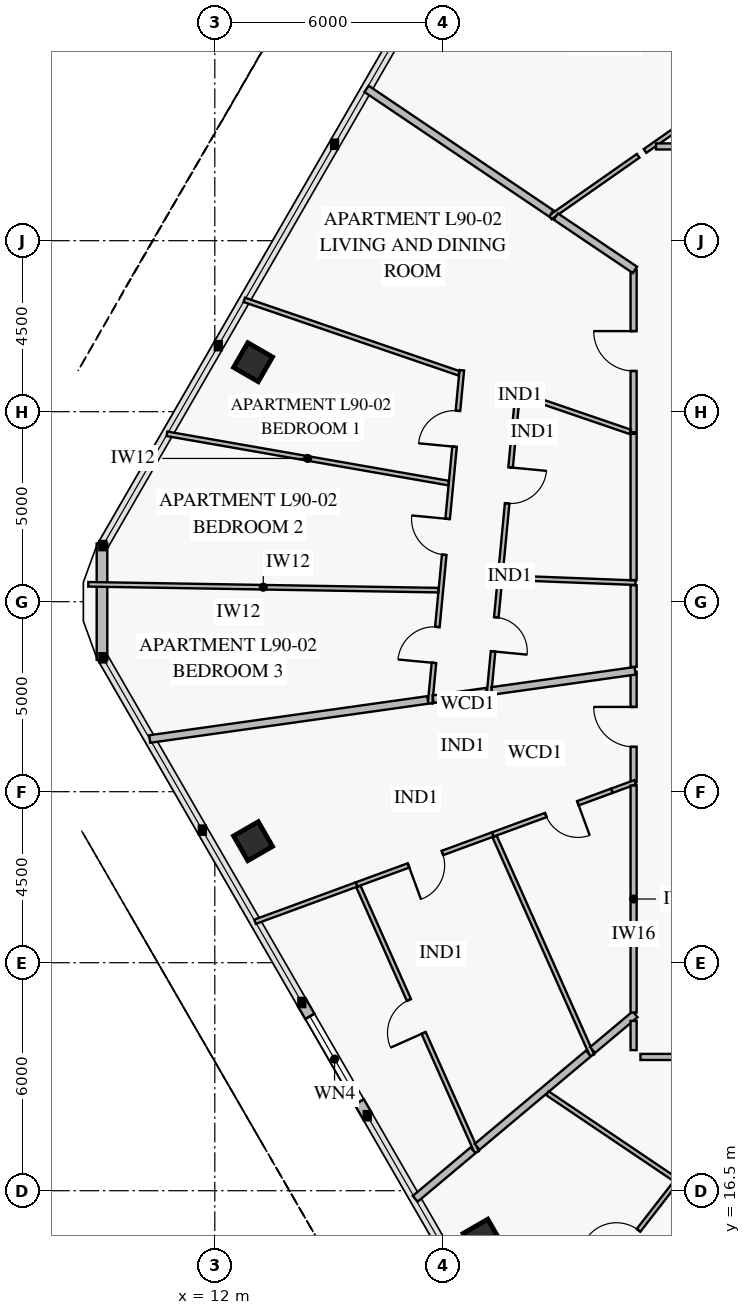
"""IFC4 building model, lengths in metres.
Left out: names, types, materials, properties, quantities, classifications, styles, units other than length and angle.
Written with IfcOpenShell. Run it as: python <this file> out.ifc"""

import sys

from ifc_helpers import new_model, si_unit, direction, frame, frame_2d, origin, origin_2d, place, context, subcontext, project, spatial, rectangle, extrude, element, fill, save


model = new_model("IFC4")
c1 = context("Model", 3, precision=1e-05, world=origin(), true_north=direction((0.0, 1.0)))
c2 = subcontext(c1, "Body", "Model", "MODEL_VIEW")
j1 = project(units=[si_unit("LENGTHUNIT", "METRE"), si_unit("PLANEANGLEUNIT", "RADIAN")], contexts=[c1])
p1 = place(None, origin())
s1 = spatial("IfcSite", under=j1, at=p1, CompositionType="ELEMENT")
p2 = place(p1, origin())
s2 = spatial("IfcBuilding", under=s1, at=p2, CompositionType="ELEMENT")
p3 = place(p2, frame((0.0, 0.0, 353.8)))
s3 = spatial("IfcBuildingStorey", under=s2, at=p3, CompositionType="ELEMENT", Elevation=353.8)
for number, where, z_axis, x_axis in (
    (1, (13.007, 38.302, 0.0), (0.0, 0.0, 1.0), (-0.5, -0.866, 0.0)),
    (2, (13.007, 25.698, 0.0), (0.0, 0.0, 1.0), (0.5, -0.866, 0.0)),
    (3, (19.045, 15.238, 0.0), (0.0, 0.0, 1.0), (0.5, -0.866, 0.0)),
):
    element("IfcColumn", number, at=place(p3, frame(where, z_axis=z_axis, x_axis=x_axis)), inside=s3, PredefinedType="COLUMN", context=c2, shape_type="SweptSolid", body=[
        extrude(rectangle(XDim=0.75, YDim=0.75, at=origin_2d()), origin(), (0.0, 0.0, 1.0), 3.35),
    ])
p4 = place(p3, frame((16.011, 18.473, 0.0), z_axis=(0.0, 0.0, 1.0), x_axis=(-0.500009156386, 0.866020117278, 0.0)))
e4 = element("IfcWall", 4, at=p4, inside=s3, PredefinedType="SOLIDWALL", context=c2, shape_type="SweptSolid", body=[
    extrude(rectangle(XDim=3.44, YDim=0.28, at=frame_2d((1.72, 0.0))), origin(), (0.0, 0.0, 1.0), 3.35),
])
p5 = place(p4, frame((0.42, 0.0, 0.7)))
e5 = element("IfcOpeningElement", 5, at=p5, cuts=e4, PredefinedType="OPENING", context=c2, shape_type="SweptSolid", body=[
    extrude(rectangle(XDim=2.6, YDim=1.8, at=frame_2d((1.3, 0.9))), frame((0.0, 0.152, 0.0), z_axis=(0.0, -1.0, 0.0), x_axis=(1.0, 0.0, 0.0)), (0.0, 0.0, 1.0), 0.304),
])
p6 = place(p3, frame((9.031, 30.468, 0.0), z_axis=(0.0, 0.0, 1.0), x_axis=(0.0, 1.0, 0.0)))
e6 = element("IfcWall", 6, at=p6, inside=s3, PredefinedType="SOLIDWALL", context=c2, shape_type="SweptSolid", body=[
    extrude(rectangle(XDim=3.065, YDim=0.28, at=frame_2d((1.532, 0.0))), origin(), (0.0, 0.0, 1.0), 3.35),
])
p7 = place(p3, frame((19.979, 37.585, 0.0), z_axis=(0.0, 0.0, 1.0), x_axis=(-0.094824773931, -0.995493979012, 0.0)))
e7 = element("IfcWall", 7, at=p7, inside=s3, PredefinedType="PARTITIONING", context=c2, shape_type="SweptSolid", body=[
    extrude(rectangle(XDim=8.082, YDim=0.12, at=frame_2d((4.041, 0.0))), origin(), (0.0, 0.0, 1.0), 2.8),
])
p8 = place(p7, frame((2.061, 0.0, 0.0)))
e8 = element("IfcOpeningElement", 8, at=p8, cuts=e7, PredefinedType="OPENING", context=c2, shape_type="SweptSolid", body=[
    extrude(rectangle(XDim=0.95, YDim=2.1, at=frame_2d((0.475, 1.05))), frame((0.0, 0.072, 0.0), z_axis=(0.0, -1.0, 0.0), x_axis=(1.0, 0.0, 0.0)), (0.0, 0.0, 1.0), 0.144),
])
p9 = place(p7, frame((6.024, 0.0, 0.0)))
e9 = element("IfcOpeningElement", 9, at=p9, cuts=e7, PredefinedType="OPENING", context=c2, shape_type="SweptSolid", body=[
    extrude(rectangle(XDim=0.9, YDim=2.1, at=frame_2d((0.45, 1.05))), frame((0.0, 0.072, 0.0), z_axis=(0.0, -1.0, 0.0), x_axis=(1.0, 0.0, 0.0)), (0.0, 0.0, 1.0), 0.144),
])
p10 = place(p3, frame((18.5, 38.091, 0.0), z_axis=(0.0, 0.0, 1.0), x_axis=(-0.094793396489, -0.995496967339, 0.0)))
e10 = element("IfcWall", 10, at=p10, inside=s3, PredefinedType="PARTITIONING", context=c2, shape_type="SweptSolid", body=[
    extrude(rectangle(XDim=8.808, YDim=0.12, at=frame_2d((4.404, 0.0))), origin(), (0.0, 0.0, 1.0), 2.8),
])
p11 = place(p10, frame((1.072, 0.0, 0.0)))
e11 = element("IfcOpeningElement", 11, at=p11, cuts=e10, PredefinedType="OPENING", context=c2, shape_type="SweptSolid", body=[
    extrude(rectangle(XDim=0.95, YDim=2.1, at=frame_2d((0.475, 1.05))), frame((0.0, 0.072, 0.0), z_axis=(0.0, -1.0, 0.0), x_axis=(1.0, 0.0, 0.0)), (0.0, 0.0, 1.0), 0.144),
])
p12 = place(p10, frame((3.929, 0.0, 0.0)))
e12 = element("IfcOpeningElement", 12, at=p12, cuts=e10, PredefinedType="OPENING", context=c2, shape_type="SweptSolid", body=[
    extrude(rectangle(XDim=0.95, YDim=2.1, at=frame_2d((0.475, 1.05))), frame((0.0, 0.072, 0.0), z_axis=(0.0, -1.0, 0.0), x_axis=(1.0, 0.0, 0.0)), (0.0, 0.0, 1.0), 0.144),
])
p13 = place(p10, frame((6.786, 0.0, 0.0)))
e13 = element("IfcOpeningElement", 13, at=p13, cuts=e10, PredefinedType="OPENING", context=c2, shape_type="SweptSolid", body=[
    extrude(rectangle(XDim=0.95, YDim=2.1, at=frame_2d((0.475, 1.05))), frame((0.0, 0.072, 0.0), z_axis=(0.0, -1.0, 0.0), x_axis=(1.0, 0.0, 0.0)), (0.0, 0.0, 1.0), 0.144),
])
p14 = place(p3, frame((23.02, 40.731, 0.0), z_axis=(0.0, 0.0, 1.0), x_axis=(0.0, -1.0, 0.0)))
e14 = element("IfcWall", 14, at=p14, inside=s3, PredefinedType="PARTITIONING", context=c2, shape_type="SweptSolid", body=[
    extrude(rectangle(XDim=4.271, YDim=0.16, at=frame_2d((2.135, 0.0))), origin(), (0.0, 0.0, 1.0), 3.35),
])
p15 = place(p14, frame((1.611, 0.0, 0.0)))
e15 = element("IfcOpeningElement", 15, at=p15, cuts=e14, PredefinedType="OPENING", context=c2, shape_type="SweptSolid", body=[
    extrude(rectangle(XDim=1.05, YDim=2.15, at=frame_2d((0.525, 1.075))), frame((0.0, 0.092, 0.0), z_axis=(0.0, -1.0, 0.0), x_axis=(1.0, 0.0, 0.0)), (0.0, 0.0, 1.0), 0.184),
])
p16 = place(p3, frame((22.45, 27.025, 0.0), z_axis=(0.0, 0.0, 1.0), x_axis=(-0.938729085526, -0.344655921155, 0.0)))
e16 = element("IfcWall", 16, at=p16, inside=s3, PredefinedType="PARTITIONING", context=c2, shape_type="SweptSolid", body=[
    extrude(rectangle(XDim=3.343, YDim=0.12, at=frame_2d((1.671, 0.0))), origin(), (0.0, 0.0, 1.0), 3.35),
])
p17 = place(p16, frame((0.954, 0.0, 0.0)))
e17 = element("IfcOpeningElement", 17, at=p17, cuts=e16, PredefinedType="OPENING", context=c2, shape_type="SweptSolid", body=[
    extrude(rectangle(XDim=0.9, YDim=2.1, at=frame_2d((0.45, 1.05))), frame((0.0, 0.072, 0.0), z_axis=(0.0, -1.0, 0.0), x_axis=(1.0, 0.0, 0.0)), (0.0, 0.0, 1.0), 0.144),
])
p18 = place(p3, frame((19.312, 25.873, 0.0), z_axis=(0.0, 0.0, 1.0), x_axis=(-0.938737752341, -0.344632314692, 0.0)))
e18 = element("IfcWall", 18, at=p18, inside=s3, PredefinedType="PARTITIONING", context=c2, shape_type="SweptSolid", body=[
    extrude(rectangle(XDim=3.818, YDim=0.12, at=frame_2d((1.909, 0.0))), origin(), (0.0, 0.0, 1.0), 3.0),
])
p19 = place(p18, frame((1.409, 0.0, 0.0)))
e19 = element("IfcOpeningElement", 19, at=p19, cuts=e18, PredefinedType="OPENING", context=c2, shape_type="SweptSolid", body=[
    extrude(rectangle(XDim=0.95, YDim=2.1, at=frame_2d((0.475, 1.05))), frame((0.0, 0.072, 0.0), z_axis=(0.0, -1.0, 0.0), x_axis=(1.0, 0.0, 0.0)), (0.0, 0.0, 1.0), 0.144),
])
p20 = place(p3, frame((15.779, 24.504, 0.0), z_axis=(0.0, 0.0, 1.0), x_axis=(0.406754151675, -0.913537662111, 0.0)))
e20 = element("IfcWall", 20, at=p20, inside=s3, PredefinedType="PARTITIONING", context=c2, shape_type="SweptSolid", body=[
    extrude(rectangle(XDim=7.652, YDim=0.12, at=frame_2d((3.826, 0.0))), origin(), (0.0, 0.0, 1.0), 3.35),
])
p21 = place(p20, frame((3.267, 0.0, 0.0)))
e21 = element("IfcOpeningElement", 21, at=p21, cuts=e20, PredefinedType="OPENING", context=c2, shape_type="SweptSolid", body=[
    extrude(rectangle(XDim=0.95, YDim=2.1, at=frame_2d((0.475, 1.05))), frame((0.0, 0.072, 0.0), z_axis=(0.0, -1.0, 0.0), x_axis=(1.0, 0.0, 0.0)), (0.0, 0.0, 1.0), 0.144),
])
p22 = place(p3, frame((23.02, 30.156, 0.0), z_axis=(0.0, 0.0, 1.0), x_axis=(0.0, -1.0, 0.0)))
e22 = element("IfcWall", 22, at=p22, inside=s3, PredefinedType="PARTITIONING", context=c2, shape_type="SweptSolid", body=[
    extrude(rectangle(XDim=2.9, YDim=0.16, at=frame_2d((1.45, 0.0))), origin(), (0.0, 0.0, 1.0), 2.8),
])
p23 = place(p22, frame((0.925, 0.0, 0.0)))
e23 = element("IfcOpeningElement", 23, at=p23, cuts=e22, PredefinedType="OPENING", context=c2, shape_type="SweptSolid", body=[
    extrude(rectangle(XDim=1.05, YDim=2.15, at=frame_2d((0.525, 1.075))), frame((0.0, 0.092, 0.0), z_axis=(0.0, -1.0, 0.0), x_axis=(1.0, 0.0, 0.0)), (0.0, 0.0, 1.0), 0.184),
])
p24 = place(p3, frame((24.149, 16.744, 0.0), z_axis=(0.0, 0.0, 1.0), x_axis=(-0.613439949778, -0.789741367801, 0.0)))
e24 = element("IfcWall", 24, at=p24, inside=s3, PredefinedType="PARTITIONING", context=c2, shape_type="SweptSolid", body=[
    extrude(rectangle(XDim=3.073, YDim=0.12, at=frame_2d((1.536, 0.0))), origin(), (0.0, 0.0, 1.0), 3.35),
])
p25 = place(p24, frame((1.628, 0.0, 0.0)))
e25 = element("IfcOpeningElement", 25, at=p25, cuts=e24, PredefinedType="OPENING", context=c2, shape_type="SweptSolid", body=[
    extrude(rectangle(XDim=0.95, YDim=2.1, at=frame_2d((0.475, 1.05))), frame((0.0, 0.072, 0.0), z_axis=(0.0, -1.0, 0.0), x_axis=(1.0, 0.0, 0.0)), (0.0, 0.0, 1.0), 0.144),
])
p26 = place(p3, frame((27.427, 46.736, 0.0), z_axis=(0.0, 0.0, 1.0), x_axis=(-0.819165574648, -0.573557112511, 0.0)))
e26 = element("IfcWall", 26, at=p26, inside=s3, PredefinedType="PARTITIONING", context=c2, shape_type="SweptSolid", body=[
    extrude(rectangle(XDim=5.014, YDim=0.12, at=frame_2d((2.507, 0.0))), origin(), (0.0, 0.0, 1.0), 2.8),
])
p27 = place(p3, frame((23.14, 43.734, 0.0), z_axis=(0.0, 0.0, 1.0), x_axis=(-0.819170990497, -0.57354937741, 0.0)))
e27 = element("IfcWall", 27, at=p27, inside=s3, PredefinedType="PARTITIONING", context=c2, shape_type="SweptSolid", body=[
    extrude(rectangle(XDim=2.824, YDim=0.12, at=frame_2d((1.412, 0.0))), origin(), (0.0, 0.0, 1.0), 3.0),
])
p28 = place(p3, frame((23.056, 40.731, 0.0), z_axis=(0.0, 0.0, 1.0), x_axis=(-0.829030181168, 0.559203861497, 0.0)))
e28 = element("IfcWall", 28, at=p28, inside=s3, PredefinedType="PARTITIONING", context=c2, shape_type="SweptSolid", body=[
    extrude(rectangle(XDim=2.51, YDim=0.2, at=frame_2d((1.255, 0.0))), origin(), (0.0, 0.0, 1.0), 3.35),
])
p29 = place(p3, frame((20.854, 42.216, 0.0), z_axis=(0.0, 0.0, 1.0), x_axis=(-0.829040257145, 0.559188923382, 0.0)))
e29 = element("IfcWall", 29, at=p29, inside=s3, PredefinedType="PARTITIONING", context=c2, shape_type="SweptSolid", body=[
    extrude(rectangle(XDim=5.864, YDim=0.2, at=frame_2d((2.932, 0.0))), origin(), (0.0, 0.0, 1.0), 2.77),
])
p30 = place(p3, frame((23.07, 32.5, 0.0), z_axis=(0.0, 0.0, 1.0), x_axis=(-0.999254664498, 0.038602013934, 0.0)))
e30 = element("IfcWall", 30, at=p30, inside=s3, PredefinedType="PARTITIONING", context=c2, shape_type="SweptSolid", body=[
    extrude(rectangle(XDim=3.498, YDim=0.12, at=frame_2d((1.749, 0.0))), origin(), (0.0, 0.0, 1.0), 3.35),
])
p31 = place(p3, frame((18.149, 35.122, 0.0), z_axis=(0.0, 0.0, 1.0), x_axis=(-0.985053609483, 0.172248037566, 0.0)))
e31 = element("IfcWall", 31, at=p31, inside=s3, PredefinedType="PARTITIONING", context=c2, shape_type="SweptSolid", body=[
    extrude(rectangle(XDim=7.521, YDim=0.12, at=frame_2d((3.76, 0.0))), origin(), (0.0, 0.0, 1.0), 2.77),
])
p32 = place(p3, frame((17.88, 32.304, 0.0), z_axis=(0.0, 0.0, 1.0), x_axis=(-0.999859663912, 0.016752685779, 0.0)))
e32 = element("IfcWall", 32, at=p32, inside=s3, PredefinedType="PARTITIONING", context=c2, shape_type="SweptSolid", body=[
    extrude(rectangle(XDim=9.21, YDim=0.12, at=frame_2d((4.605, 0.0))), origin(), (0.0, 0.0, 1.0), 2.77),
])
p33 = place(p3, frame((22.932, 36.469, 0.0), z_axis=(0.0, 0.0, 1.0), x_axis=(-0.946174266906, 0.323657622566, 0.0)))
e33 = element("IfcWall", 33, at=p33, inside=s3, PredefinedType="PARTITIONING", context=c2, shape_type="SweptSolid", body=[
    extrude(rectangle(XDim=3.062, YDim=0.12, at=frame_2d((1.531, 0.0))), origin(), (0.0, 0.0, 1.0), 3.35),
])
p34 = place(p3, frame((18.424, 38.011, 0.0), z_axis=(0.0, 0.0, 1.0), x_axis=(-0.946192330219, 0.323604811822, 0.0)))
e34 = element("IfcWall", 34, at=p34, inside=s3, PredefinedType="PARTITIONING", context=c2, shape_type="SweptSolid", body=[
    extrude(rectangle(XDim=5.969, YDim=0.12, at=frame_2d((2.985, 0.0))), origin(), (0.0, 0.0, 1.0), 2.77),
])
p35 = place(p3, frame((23.06, 30.181, 0.0), z_axis=(0.0, 0.0, 1.0), x_axis=(-0.990263903047, -0.139202738201, 0.0)))
e35 = element("IfcWall", 35, at=p35, inside=s3, PredefinedType="PARTITIONING", context=c2, shape_type="SweptSolid", body=[
    extrude(rectangle(XDim=3.806, YDim=0.2, at=frame_2d((1.903, 0.0))), origin(), (0.0, 0.0, 1.0), 3.35),
])
p36 = place(p3, frame((19.153, 29.632, 0.0), z_axis=(0.0, 0.0, 1.0), x_axis=(-0.990245854096, -0.139331074948, 0.0)))
e36 = element("IfcWall", 36, at=p36, inside=s3, PredefinedType="PARTITIONING", context=c2, shape_type="SweptSolid", body=[
    extrude(rectangle(XDim=1.423, YDim=0.2, at=frame_2d((0.711, 0.0))), origin(), (0.0, 0.0, 1.0), 3.35),
])
p37 = place(p3, frame((17.605, 29.415, 0.0), z_axis=(0.0, 0.0, 1.0), x_axis=(-0.990268108888, -0.139172815303, 0.0)))
e37 = element("IfcWall", 37, at=p37, inside=s3, PredefinedType="PARTITIONING", context=c2, shape_type="SweptSolid", body=[
    extrude(rectangle(XDim=7.389, YDim=0.2, at=frame_2d((3.694, 0.0))), origin(), (0.0, 0.0, 1.0), 2.77),
])
p38 = place(p3, frame((23.063, 27.25, 0.0), z_axis=(0.0, 0.0, 1.0), x_axis=(-0.938807874659, -0.344441249676, 0.0)))
e38 = element("IfcWall", 38, at=p38, inside=s3, PredefinedType="PARTITIONING", context=c2, shape_type="SweptSolid", body=[
    extrude(rectangle(XDim=0.654, YDim=0.12, at=frame_2d((0.327, 0.0))), origin(), (0.0, 0.0, 1.0), 3.35),
])
p39 = place(p3, frame((15.728, 24.558, 0.0), z_axis=(0.0, 0.0, 1.0), x_axis=(-0.938703216717, -0.344726371089, 0.0)))
e39 = element("IfcWall", 39, at=p39, inside=s3, PredefinedType="PARTITIONING", context=c2, shape_type="SweptSolid", body=[
    extrude(rectangle(XDim=2.844, YDim=0.12, at=frame_2d((1.422, 0.0))), origin(), (0.0, 0.0, 1.0), 2.77),
])
p40 = place(p3, frame((19.363, 25.82, 0.0), z_axis=(0.0, 0.0, 1.0), x_axis=(0.406702567346, -0.913560628374, 0.0)))
e40 = element("IfcWall", 40, at=p40, inside=s3, PredefinedType="PARTITIONING", context=c2, shape_type="SweptSolid", body=[
    extrude(rectangle(XDim=6.304, YDim=0.12, at=frame_2d((3.152, 0.0))), origin(), (0.0, 0.0, 1.0), 3.0),
])
p41 = place(p3, frame((23.06, 21.142, 0.0), z_axis=(0.0, 0.0, 1.0), x_axis=(-0.766056395585, -0.642773365024, 0.0)))
e41 = element("IfcWall", 41, at=p41, inside=s3, PredefinedType="PARTITIONING", context=c2, shape_type="SweptSolid", body=[
    extrude(rectangle(XDim=1.463, YDim=0.2, at=frame_2d((0.732, 0.0))), origin(), (0.0, 0.0, 1.0), 3.35),
])
p42 = place(p3, frame((21.831, 20.111, 0.0), z_axis=(0.0, 0.0, 1.0), x_axis=(-0.766011894934, -0.642826397108, 0.0)))
e42 = element("IfcWall", 42, at=p42, inside=s3, PredefinedType="PARTITIONING", context=c2, shape_type="SweptSolid", body=[
    extrude(rectangle(XDim=3.821, YDim=0.2, at=frame_2d((1.911, 0.0))), origin(), (0.0, 0.0, 1.0), 3.0),
])
p43 = place(p3, frame((18.795, 17.563, 0.0), z_axis=(0.0, 0.0, 1.0), x_axis=(-0.766060718976, -0.642768212376, 0.0)))
e43 = element("IfcWall", 43, at=p43, inside=s3, PredefinedType="PARTITIONING", context=c2, shape_type="SweptSolid", body=[
    extrude(rectangle(XDim=1.986, YDim=0.2, at=frame_2d((0.993, 0.0))), origin(), (0.0, 0.0, 1.0), 2.77),
])
p44 = place(p3, frame((20.752, 19.065, 0.0), z_axis=(0.0, 0.0, 1.0), x_axis=(0.829050018, -0.559174451896, 0.0)))
e44 = element("IfcWall", 44, at=p44, inside=s3, PredefinedType="PARTITIONING", context=c2, shape_type="SweptSolid", body=[
    extrude(rectangle(XDim=4.047, YDim=0.12, at=frame_2d((2.024, 0.0))), origin(), (0.0, 0.0, 1.0), 2.8),
])
p45 = place(p3, frame((29.016, 43.98, 0.0), z_axis=(0.0, 0.0, 1.0), x_axis=(-1.0, 0.0, 0.0)))
e45 = element("IfcWall", 45, at=p45, inside=s3, PredefinedType="PARTITIONING", context=c2, shape_type="SweptSolid", body=[
    extrude(rectangle(XDim=5.406, YDim=0.16, at=frame_2d((2.703, 0.0))), origin(), (0.0, 0.0, 1.0), 2.8),
])
p46 = place(p3, frame((23.02, 36.418, 0.0), z_axis=(0.0, 0.0, 1.0), x_axis=(0.0, -1.0, 0.0)))
e46 = element("IfcWall", 46, at=p46, inside=s3, PredefinedType="PARTITIONING", context=c2, shape_type="SweptSolid", body=[
    extrude(rectangle(XDim=3.848, YDim=0.16, at=frame_2d((1.924, 0.0))), origin(), (0.0, 0.0, 1.0), 2.8),
])
p47 = place(p3, frame((23.02, 32.434, 0.0), z_axis=(0.0, 0.0, 1.0), x_axis=(0.0, -1.0, 0.0)))
e47 = element("IfcWall", 47, at=p47, inside=s3, PredefinedType="PARTITIONING", context=c2, shape_type="SweptSolid", body=[
    extrude(rectangle(XDim=2.149, YDim=0.16, at=frame_2d((1.074, 0.0))), origin(), (0.0, 0.0, 1.0), 3.35),
])
p48 = place(p3, frame((23.02, 27.162, 0.0), z_axis=(0.0, 0.0, 1.0), x_axis=(0.0, -1.0, 0.0)))
e48 = element("IfcWall", 48, at=p48, inside=s3, PredefinedType="PARTITIONING", context=c2, shape_type="SweptSolid", body=[
    extrude(rectangle(XDim=5.972, YDim=0.16, at=frame_2d((2.986, 0.0))), origin(), (0.0, 0.0, 1.0), 3.35),
])
p49 = place(p3, frame((23.2, 20.02, 0.0), z_axis=(0.0, 0.0, 1.0), x_axis=(1.0, 0.0, 0.0)))
e49 = element("IfcWall", 49, at=p49, inside=s3, PredefinedType="PARTITIONING", context=c2, shape_type="SweptSolid", body=[
    extrude(rectangle(XDim=3.408, YDim=0.16, at=frame_2d((1.704, 0.0))), origin(), (0.0, 0.0, 1.0), 2.8),
])
p50 = place(p3, frame((23.02, 20.968, 0.0), z_axis=(0.0, 0.0, 1.0), x_axis=(0.0, -1.0, 0.0)))
e50 = element("IfcWall", 50, at=p50, inside=s3, PredefinedType="PARTITIONING", context=c2, shape_type="SweptSolid", body=[
    extrude(rectangle(XDim=0.768, YDim=0.16, at=frame_2d((0.384, 0.0))), origin(), (0.0, 0.0, 1.0), 3.35),
])
p51 = place(p5, origin())
e51 = element("IfcWindow", 51, at=p51, inside=s3, PartitioningType="SINGLE_PANEL", PredefinedType="WINDOW", context=c2, shape_type="SweptSolid", body=[
    extrude(rectangle(XDim=2.6, YDim=1.8, at=frame_2d((1.3, 0.9))), frame((0.0, 0.03, 0.0), z_axis=(0.0, -1.0, 0.0), x_axis=(1.0, 0.0, 0.0)), (0.0, 0.0, 1.0), 0.06),
])
fill(e5, e51)
p52 = place(p8, origin())
e52 = element("IfcDoor", 52, at=p52, inside=s3, OperationType="SINGLE_SWING_LEFT", PredefinedType="DOOR", context=c2, shape_type="SweptSolid", body=[
    extrude(rectangle(XDim=0.95, YDim=2.1, at=frame_2d((0.475, 1.05))), frame((0.0, 0.025, 0.0), z_axis=(0.0, -1.0, 0.0), x_axis=(1.0, 0.0, 0.0)), (0.0, 0.0, 1.0), 0.05),
])
fill(e8, e52)
p53 = place(p9, origin())
e53 = element("IfcDoor", 53, at=p53, inside=s3, OperationType="SINGLE_SWING_RIGHT", PredefinedType="DOOR", context=c2, shape_type="SweptSolid", body=[
    extrude(rectangle(XDim=0.9, YDim=2.1, at=frame_2d((0.45, 1.05))), frame((0.0, 0.025, 0.0), z_axis=(0.0, -1.0, 0.0), x_axis=(1.0, 0.0, 0.0)), (0.0, 0.0, 1.0), 0.05),
])
fill(e9, e53)
p54 = place(p11, frame((0.95, 0.0, 0.0), z_axis=(0.0, 0.0, 1.0), x_axis=(-1.0, 0.0, 0.0)))
e54 = element("IfcDoor", 54, at=p54, inside=s3, OperationType="SINGLE_SWING_LEFT", PredefinedType="DOOR", context=c2, shape_type="SweptSolid", body=[
    extrude(rectangle(XDim=0.95, YDim=2.1, at=frame_2d((0.475, 1.05))), frame((0.0, 0.025, 0.0), z_axis=(0.0, -1.0, 0.0), x_axis=(1.0, 0.0, 0.0)), (0.0, 0.0, 1.0), 0.05),
])
fill(e11, e54)
p55 = place(p12, frame((0.95, 0.0, 0.0), z_axis=(0.0, 0.0, 1.0), x_axis=(-1.0, 0.0, 0.0)))
e55 = element("IfcDoor", 55, at=p55, inside=s3, OperationType="SINGLE_SWING_RIGHT", PredefinedType="DOOR", context=c2, shape_type="SweptSolid", body=[
    extrude(rectangle(XDim=0.95, YDim=2.1, at=frame_2d((0.475, 1.05))), frame((0.0, 0.025, 0.0), z_axis=(0.0, -1.0, 0.0), x_axis=(1.0, 0.0, 0.0)), (0.0, 0.0, 1.0), 0.05),
])
fill(e12, e55)
p56 = place(p13, frame((0.95, 0.0, 0.0), z_axis=(0.0, 0.0, 1.0), x_axis=(-1.0, 0.0, 0.0)))
e56 = element("IfcDoor", 56, at=p56, inside=s3, OperationType="SINGLE_SWING_LEFT", PredefinedType="DOOR", context=c2, shape_type="SweptSolid", body=[
    extrude(rectangle(XDim=0.95, YDim=2.1, at=frame_2d((0.475, 1.05))), frame((0.0, 0.025, 0.0), z_axis=(0.0, -1.0, 0.0), x_axis=(1.0, 0.0, 0.0)), (0.0, 0.0, 1.0), 0.05),
])
fill(e13, e56)
p57 = place(p15, frame((1.05, 0.0, 0.0), z_axis=(0.0, 0.0, 1.0), x_axis=(-1.0, 0.0, 0.0)))
e57 = element("IfcDoor", 57, at=p57, inside=s3, OperationType="SINGLE_SWING_RIGHT", PredefinedType="DOOR", context=c2, shape_type="SweptSolid", body=[
    extrude(rectangle(XDim=1.05, YDim=2.15, at=frame_2d((0.525, 1.075))), frame((0.0, 0.025, 0.0), z_axis=(0.0, -1.0, 0.0), x_axis=(1.0, 0.0, 0.0)), (0.0, 0.0, 1.0), 0.05),
])
fill(e15, e57)
p58 = place(p17, origin())
e58 = element("IfcDoor", 58, at=p58, inside=s3, OperationType="SINGLE_SWING_LEFT", PredefinedType="DOOR", context=c2, shape_type="SweptSolid", body=[
    extrude(rectangle(XDim=0.9, YDim=2.1, at=frame_2d((0.45, 1.05))), frame((0.0, 0.025, 0.0), z_axis=(0.0, -1.0, 0.0), x_axis=(1.0, 0.0, 0.0)), (0.0, 0.0, 1.0), 0.05),
])
fill(e17, e58)
p59 = place(p19, origin())
e59 = element("IfcDoor", 59, at=p59, inside=s3, OperationType="SINGLE_SWING_RIGHT", PredefinedType="DOOR", context=c2, shape_type="SweptSolid", body=[
    extrude(rectangle(XDim=0.95, YDim=2.1, at=frame_2d((0.475, 1.05))), frame((0.0, 0.025, 0.0), z_axis=(0.0, -1.0, 0.0), x_axis=(1.0, 0.0, 0.0)), (0.0, 0.0, 1.0), 0.05),
])
fill(e19, e59)
p60 = place(p21, frame((0.95, 0.0, 0.0), z_axis=(0.0, 0.0, 1.0), x_axis=(-1.0, 0.0, 0.0)))
e60 = element("IfcDoor", 60, at=p60, inside=s3, OperationType="SINGLE_SWING_LEFT", PredefinedType="DOOR", context=c2, shape_type="SweptSolid", body=[
    extrude(rectangle(XDim=0.95, YDim=2.1, at=frame_2d((0.475, 1.05))), frame((0.0, 0.025, 0.0), z_axis=(0.0, -1.0, 0.0), x_axis=(1.0, 0.0, 0.0)), (0.0, 0.0, 1.0), 0.05),
])
fill(e21, e60)
p61 = place(p23, frame((1.05, 0.0, 0.0), z_axis=(0.0, 0.0, 1.0), x_axis=(-1.0, 0.0, 0.0)))
e61 = element("IfcDoor", 61, at=p61, inside=s3, OperationType="SINGLE_SWING_RIGHT", PredefinedType="DOOR", context=c2, shape_type="SweptSolid", body=[
    extrude(rectangle(XDim=1.05, YDim=2.15, at=frame_2d((0.525, 1.075))), frame((0.0, 0.025, 0.0), z_axis=(0.0, -1.0, 0.0), x_axis=(1.0, 0.0, 0.0)), (0.0, 0.0, 1.0), 0.05),
])
fill(e23, e61)
p62 = place(p25, frame((0.95, 0.0, 0.0), z_axis=(0.0, 0.0, 1.0), x_axis=(-1.0, 0.0, 0.0)))
e62 = element("IfcDoor", 62, at=p62, inside=s3, OperationType="SINGLE_SWING_LEFT", PredefinedType="DOOR", context=c2, shape_type="SweptSolid", body=[
    extrude(rectangle(XDim=0.95, YDim=2.1, at=frame_2d((0.475, 1.05))), frame((0.0, 0.025, 0.0), z_axis=(0.0, -1.0, 0.0), x_axis=(1.0, 0.0, 0.0)), (0.0, 0.0, 1.0), 0.05),
])
fill(e25, e62)
save(model, sys.argv[1])
